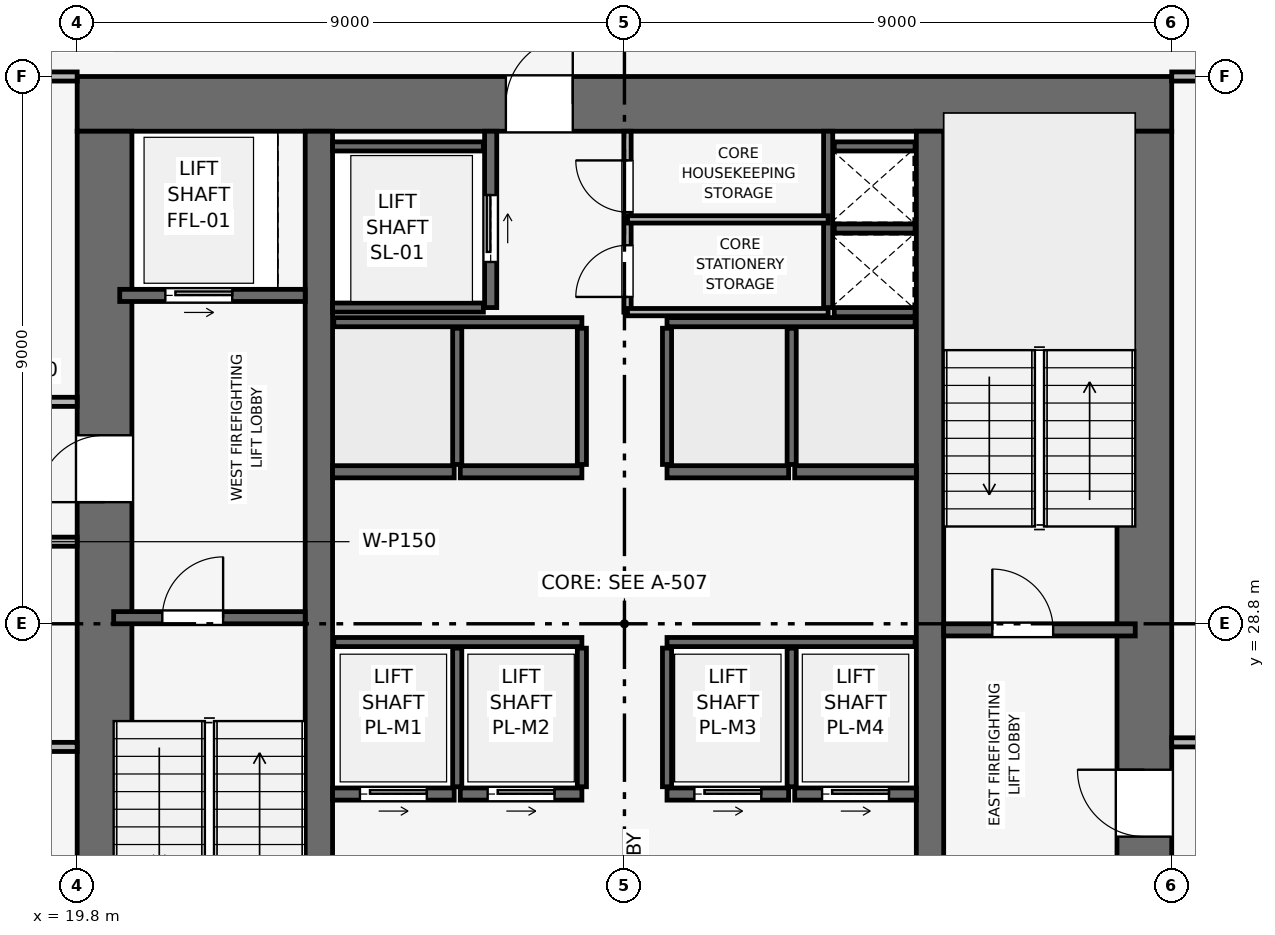
"""IFC4 building model, lengths in metres.
Left out: names, types, materials, properties, quantities, classifications, styles, units other than length and angle.
Written with IfcOpenShell. Run it as: python <this file> out.ifc"""

import sys

from ifc_helpers import new_model, si_unit, direction, frame, frame_2d, origin, place, context, subcontext, project, spatial, rectangle, extrude, element, fill, save


model = new_model("IFC4")
c1 = context("Model", 3, precision=1e-05, world=origin(), true_north=direction((0.0, 1.0)))
c2 = subcontext(c1, "Body", "Model", "MODEL_VIEW")
j1 = project(units=[si_unit("LENGTHUNIT", "METRE"), si_unit("PLANEANGLEUNIT", "RADIAN")], contexts=[c1])
p1 = place(None, origin())
s1 = spatial("IfcSite", under=j1, at=p1, CompositionType="ELEMENT")
p2 = place(p1, origin())
s2 = spatial("IfcBuilding", under=s1, at=p2, CompositionType="ELEMENT")
p3 = place(p2, frame((0.0, 0.0, 153.3)))
s3 = spatial("IfcBuildingStorey", under=s2, at=p3, CompositionType="ELEMENT", Elevation=153.3)
p4 = place(p3, frame((19.8, 37.35, 0.0), z_axis=(0.0, 0.0, 1.0), x_axis=(1.0, 0.0, 0.0)))
e1 = element("IfcWall", 1, at=p4, inside=s3, PredefinedType="SHEAR", context=c2, shape_type="SweptSolid", body=[
    extrude(rectangle(XDim=18.0, YDim=0.9, at=frame_2d((9.0, 0.0))), origin(), (0.0, 0.0, 1.0), 3.75),
])
p5 = place(p4, frame((7.05, 0.0, 0.0)))
e2 = element("IfcOpeningElement", 2, at=p5, cuts=e1, PredefinedType="OPENING", context=c2, shape_type="SweptSolid", body=[
    extrude(rectangle(XDim=1.1, YDim=2.15, at=frame_2d((0.55, 1.075))), frame((0.0, 0.46, 0.0), z_axis=(0.0, -1.0, 0.0), x_axis=(1.0, 0.0, 0.0)), (0.0, 0.0, 1.0), 0.92),
])
p6 = place(p3, frame((20.25, 20.7, 0.0), z_axis=(0.0, 0.0, 1.0), x_axis=(0.0, 1.0, 0.0)))
e3 = element("IfcWall", 3, at=p6, inside=s3, PredefinedType="SHEAR", context=c2, shape_type="SweptSolid", body=[
    extrude(rectangle(XDim=16.2, YDim=0.9, at=frame_2d((8.1, 0.0))), origin(), (0.0, 0.0, 1.0), 3.75),
])
p7 = place(p6, frame((10.1, 0.0, 0.0)))
e4 = element("IfcOpeningElement", 4, at=p7, cuts=e3, PredefinedType="OPENING", context=c2, shape_type="SweptSolid", body=[
    extrude(rectangle(XDim=1.1, YDim=2.15, at=frame_2d((0.55, 1.075))), frame((0.0, 0.46, 0.0), z_axis=(0.0, -1.0, 0.0), x_axis=(1.0, 0.0, 0.0)), (0.0, 0.0, 1.0), 0.92),
])
p8 = place(p3, frame((37.35, 20.7, 0.0), z_axis=(0.0, 0.0, 1.0), x_axis=(0.0, 1.0, 0.0)))
e5 = element("IfcWall", 5, at=p8, inside=s3, PredefinedType="SHEAR", context=c2, shape_type="SweptSolid", body=[
    extrude(rectangle(XDim=16.2, YDim=0.9, at=frame_2d((8.1, 0.0))), origin(), (0.0, 0.0, 1.0), 3.75),
])
p9 = place(p8, frame((4.6, 0.0, 0.0)))
e6 = element("IfcOpeningElement", 6, at=p9, cuts=e5, PredefinedType="OPENING", context=c2, shape_type="SweptSolid", body=[
    extrude(rectangle(XDim=1.1, YDim=2.15, at=frame_2d((0.55, 1.075))), frame((0.0, 0.46, 0.0), z_axis=(0.0, -1.0, 0.0), x_axis=(1.0, 0.0, 0.0)), (0.0, 0.0, 1.0), 0.92),
])
for number, where, z_axis, x_axis in (
    (7, (23.775, 20.7, 0.0), (0.0, 0.0, 1.0), (0.0, 1.0, 0.0)),
    (8, (33.825, 20.7, 0.0), (0.0, 0.0, 1.0), (0.0, 1.0, 0.0)),
):
    element("IfcWall", number, at=place(p3, frame(where, z_axis=z_axis, x_axis=x_axis)), inside=s3, PredefinedType="SHEAR", context=c2, shape_type="SweptSolid", body=[
        extrude(rectangle(XDim=16.2, YDim=0.45, at=frame_2d((8.1, 0.0))), origin(), (0.0, 0.0, 1.0), 3.75),
    ])
p10 = place(p3, frame((20.4, 28.9, 0.0), z_axis=(0.0, 0.0, 1.0), x_axis=(1.0, 0.0, 0.0)))
e9 = element("IfcWall", 9, at=p10, inside=s3, PredefinedType="SHEAR", context=c2, shape_type="SweptSolid", body=[
    extrude(rectangle(XDim=3.15, YDim=0.2, at=frame_2d((1.575, 0.0))), origin(), (0.0, 0.0, 1.0), 3.495),
])
p11 = place(p10, frame((0.8, 0.0, 0.0)))
e10 = element("IfcOpeningElement", 10, at=p11, cuts=e9, PredefinedType="OPENING", context=c2, shape_type="SweptSolid", body=[
    extrude(rectangle(XDim=1.0, YDim=2.1, at=frame_2d((0.5, 1.05))), frame((0.0, 0.11, 0.0), z_axis=(0.0, -1.0, 0.0), x_axis=(1.0, 0.0, 0.0)), (0.0, 0.0, 1.0), 0.22),
])
p12 = place(p3, frame((34.05, 28.7, 0.0), z_axis=(0.0, 0.0, 1.0), x_axis=(1.0, 0.0, 0.0)))
e11 = element("IfcWall", 11, at=p12, inside=s3, PredefinedType="SHEAR", context=c2, shape_type="SweptSolid", body=[
    extrude(rectangle(XDim=3.15, YDim=0.2, at=frame_2d((1.575, 0.0))), origin(), (0.0, 0.0, 1.0), 3.495),
])
p13 = place(p12, frame((0.8, 0.0, 0.0)))
e12 = element("IfcOpeningElement", 12, at=p13, cuts=e11, PredefinedType="OPENING", context=c2, shape_type="SweptSolid", body=[
    extrude(rectangle(XDim=1.0, YDim=2.1, at=frame_2d((0.5, 1.05))), frame((0.0, 0.11, 0.0), z_axis=(0.0, -1.0, 0.0), x_axis=(1.0, 0.0, 0.0)), (0.0, 0.0, 1.0), 0.22),
])
p14 = place(p3, frame((32.15, 34.0, 0.0), z_axis=(0.0, 0.0, 1.0), x_axis=(0.0, 1.0, 0.0)))
e13 = element("IfcWall", 13, at=p14, inside=s3, PredefinedType="SHEAR", context=c2, shape_type="SweptSolid", body=[
    extrude(rectangle(XDim=2.9, YDim=0.15, at=frame_2d((1.45, 0.0))), origin(), (0.0, 0.0, 1.0), 3.495),
])
for number, where, z_axis, x_axis in (
    (14, (32.25, 33.925, 0.0), (0.0, 0.0, 1.0), (1.0, 0.0, 0.0)),
    (15, (32.25, 35.3, 0.0), (0.0, 0.0, 1.0), (1.0, 0.0, 0.0)),
):
    element("IfcWall", number, at=place(p3, frame(where, z_axis=z_axis, x_axis=x_axis)), inside=s3, PredefinedType="SHEAR", context=c2, shape_type="SweptSolid", body=[
        extrude(rectangle(XDim=1.33, YDim=0.15, at=frame_2d((0.665, 0.0))), origin(), (0.0, 0.0, 1.0), 3.495),
    ])
p15 = place(p3, frame((20.5, 34.2, 0.0), z_axis=(0.0, 0.0, 1.0), x_axis=(1.0, 0.0, 0.0)))
e16 = element("IfcWall", 16, at=p15, inside=s3, PredefinedType="SHEAR", context=c2, shape_type="SweptSolid", body=[
    extrude(rectangle(XDim=3.05, YDim=0.2, at=frame_2d((1.525, 0.0))), origin(), (0.0, 0.0, 1.0), 3.495),
])
p16 = place(p15, frame((0.75, 0.0, 0.0)))
e17 = element("IfcOpeningElement", 17, at=p16, cuts=e16, PredefinedType="OPENING", context=c2, shape_type="SweptSolid", body=[
    extrude(rectangle(XDim=1.1, YDim=2.15, at=frame_2d((0.55, 1.075))), frame((0.0, 0.11, 0.0), z_axis=(0.0, -1.0, 0.0), x_axis=(1.0, 0.0, 0.0)), (0.0, 0.0, 1.0), 0.22),
])
p17 = place(p3, frame((26.6, 34.0, 0.0), z_axis=(0.0, 0.0, 1.0), x_axis=(0.0, 1.0, 0.0)))
e18 = element("IfcWall", 18, at=p17, inside=s3, PredefinedType="SHEAR", context=c2, shape_type="SweptSolid", body=[
    extrude(rectangle(XDim=2.9, YDim=0.2, at=frame_2d((1.45, 0.0))), origin(), (0.0, 0.0, 1.0), 3.495),
])
p18 = place(p17, frame((0.75, 0.0, 0.0)))
e19 = element("IfcOpeningElement", 19, at=p18, cuts=e18, PredefinedType="OPENING", context=c2, shape_type="SweptSolid", body=[
    extrude(rectangle(XDim=1.1, YDim=2.15, at=frame_2d((0.55, 1.075))), frame((0.0, 0.11, 0.0), z_axis=(0.0, -1.0, 0.0), x_axis=(1.0, 0.0, 0.0)), (0.0, 0.0, 1.0), 0.22),
])
for number, where, z_axis, x_axis in (
    (20, (24.0, 34.0, 0.0), (0.0, 0.0, 1.0), (1.0, 0.0, 0.0)),
    (21, (24.0, 36.65, 0.0), (0.0, 0.0, 1.0), (1.0, 0.0, 0.0)),
):
    element("IfcWall", number, at=place(p3, frame(where, z_axis=z_axis, x_axis=x_axis)), inside=s3, PredefinedType="SHEAR", context=c2, shape_type="SweptSolid", body=[
        extrude(rectangle(XDim=2.48, YDim=0.15, at=frame_2d((1.24, 0.0))), origin(), (0.0, 0.0, 1.0), 3.495),
    ])
p19 = place(p3, frame((24.0, 26.0, 0.0), z_axis=(0.0, 0.0, 1.0), x_axis=(1.0, 0.0, 0.0)))
e22 = element("IfcWall", 22, at=p19, inside=s3, PredefinedType="SHEAR", context=c2, shape_type="SweptSolid", body=[
    extrude(rectangle(XDim=2.0, YDim=0.2, at=frame_2d((1.0, 0.0))), origin(), (0.0, 0.0, 1.0), 3.495),
])
p20 = place(p19, frame((0.45, 0.0, 0.0)))
e23 = element("IfcOpeningElement", 23, at=p20, cuts=e22, PredefinedType="OPENING", context=c2, shape_type="SweptSolid", body=[
    extrude(rectangle(XDim=1.1, YDim=2.15, at=frame_2d((0.55, 1.075))), frame((0.0, 0.11, 0.0), z_axis=(0.0, -1.0, 0.0), x_axis=(1.0, 0.0, 0.0)), (0.0, 0.0, 1.0), 0.22),
])
p21 = place(p3, frame((26.1, 26.0, 0.0), z_axis=(0.0, 0.0, 1.0), x_axis=(1.0, 0.0, 0.0)))
e24 = element("IfcWall", 24, at=p21, inside=s3, PredefinedType="SHEAR", context=c2, shape_type="SweptSolid", body=[
    extrude(rectangle(XDim=2.0, YDim=0.2, at=frame_2d((1.0, 0.0))), origin(), (0.0, 0.0, 1.0), 3.495),
])
p22 = place(p21, frame((0.45, 0.0, 0.0)))
e25 = element("IfcOpeningElement", 25, at=p22, cuts=e24, PredefinedType="OPENING", context=c2, shape_type="SweptSolid", body=[
    extrude(rectangle(XDim=1.1, YDim=2.15, at=frame_2d((0.55, 1.075))), frame((0.0, 0.11, 0.0), z_axis=(0.0, -1.0, 0.0), x_axis=(1.0, 0.0, 0.0)), (0.0, 0.0, 1.0), 0.22),
])
p23 = place(p3, frame((29.5, 26.0, 0.0), z_axis=(0.0, 0.0, 1.0), x_axis=(1.0, 0.0, 0.0)))
e26 = element("IfcWall", 26, at=p23, inside=s3, PredefinedType="SHEAR", context=c2, shape_type="SweptSolid", body=[
    extrude(rectangle(XDim=2.0, YDim=0.2, at=frame_2d((1.0, 0.0))), origin(), (0.0, 0.0, 1.0), 3.495),
])
p24 = place(p23, frame((0.45, 0.0, 0.0)))
e27 = element("IfcOpeningElement", 27, at=p24, cuts=e26, PredefinedType="OPENING", context=c2, shape_type="SweptSolid", body=[
    extrude(rectangle(XDim=1.1, YDim=2.15, at=frame_2d((0.55, 1.075))), frame((0.0, 0.11, 0.0), z_axis=(0.0, -1.0, 0.0), x_axis=(1.0, 0.0, 0.0)), (0.0, 0.0, 1.0), 0.22),
])
p25 = place(p3, frame((31.6, 26.0, 0.0), z_axis=(0.0, 0.0, 1.0), x_axis=(1.0, 0.0, 0.0)))
e28 = element("IfcWall", 28, at=p25, inside=s3, PredefinedType="SHEAR", context=c2, shape_type="SweptSolid", body=[
    extrude(rectangle(XDim=2.0, YDim=0.2, at=frame_2d((1.0, 0.0))), origin(), (0.0, 0.0, 1.0), 3.495),
])
p26 = place(p25, frame((0.45, 0.0, 0.0)))
e29 = element("IfcOpeningElement", 29, at=p26, cuts=e28, PredefinedType="OPENING", context=c2, shape_type="SweptSolid", body=[
    extrude(rectangle(XDim=1.1, YDim=2.15, at=frame_2d((0.55, 1.075))), frame((0.0, 0.11, 0.0), z_axis=(0.0, -1.0, 0.0), x_axis=(1.0, 0.0, 0.0)), (0.0, 0.0, 1.0), 0.22),
])
for number, where, z_axis, x_axis in (
    (30, (24.0, 31.3, 0.0), (0.0, 0.0, 1.0), (1.0, 0.0, 0.0)),
    (31, (26.1, 31.3, 0.0), (0.0, 0.0, 1.0), (1.0, 0.0, 0.0)),
    (32, (29.5, 31.3, 0.0), (0.0, 0.0, 1.0), (1.0, 0.0, 0.0)),
    (33, (31.6, 31.3, 0.0), (0.0, 0.0, 1.0), (1.0, 0.0, 0.0)),
):
    element("IfcWall", number, at=place(p3, frame(where, z_axis=z_axis, x_axis=x_axis)), inside=s3, PredefinedType="SHEAR", context=c2, shape_type="SweptSolid", body=[
        extrude(rectangle(XDim=2.0, YDim=0.2, at=frame_2d((1.0, 0.0))), origin(), (0.0, 0.0, 1.0), 3.495),
    ])
p27 = place(p3, frame((32.25, 36.65, 0.0), z_axis=(0.0, 0.0, 1.0), x_axis=(1.0, 0.0, 0.0)))
e34 = element("IfcWall", 34, at=p27, inside=s3, PredefinedType="SHEAR", context=c2, shape_type="SweptSolid", body=[
    extrude(rectangle(XDim=1.33, YDim=0.15, at=frame_2d((0.665, 0.0))), origin(), (0.0, 0.0, 1.0), 3.495),
])
for number, where, z_axis, x_axis in (
    (35, (24.02, 28.5, 0.0), (0.0, 0.0, 1.0), (1.0, 0.0, 0.0)),
    (36, (29.5, 28.5, 0.0), (0.0, 0.0, 1.0), (1.0, 0.0, 0.0)),
):
    element("IfcWall", number, at=place(p3, frame(where, z_axis=z_axis, x_axis=x_axis)), inside=s3, PredefinedType="SHEAR", context=c2, shape_type="SweptSolid", body=[
        extrude(rectangle(XDim=4.08, YDim=0.15, at=frame_2d((2.04, 0.0))), origin(), (0.0, 0.0, 1.0), 3.495),
    ])
for number, where, z_axis, x_axis in (
    (37, (26.05, 26.12, 0.0), (0.0, 0.0, 1.0), (0.0, 1.0, 0.0)),
    (38, (28.1, 26.12, 0.0), (0.0, 0.0, 1.0), (0.0, 1.0, 0.0)),
    (39, (29.5, 26.12, 0.0), (0.0, 0.0, 1.0), (0.0, 1.0, 0.0)),
    (40, (31.55, 26.12, 0.0), (0.0, 0.0, 1.0), (0.0, 1.0, 0.0)),
):
    element("IfcWall", number, at=place(p3, frame(where, z_axis=z_axis, x_axis=x_axis)), inside=s3, PredefinedType="SHEAR", context=c2, shape_type="SweptSolid", body=[
        extrude(rectangle(XDim=2.28, YDim=0.15, at=frame_2d((1.14, 0.0))), origin(), (0.0, 0.0, 1.0), 3.495),
    ])
for number, where, z_axis, x_axis in (
    (41, (24.02, 33.76, 0.0), (0.0, 0.0, 1.0), (1.0, 0.0, 0.0)),
    (42, (29.5, 33.76, 0.0), (0.0, 0.0, 1.0), (1.0, 0.0, 0.0)),
):
    element("IfcWall", number, at=place(p3, frame(where, z_axis=z_axis, x_axis=x_axis)), inside=s3, PredefinedType="SHEAR", context=c2, shape_type="SweptSolid", body=[
        extrude(rectangle(XDim=4.08, YDim=0.15, at=frame_2d((2.04, 0.0))), origin(), (0.0, 0.0, 1.0), 3.495),
    ])
for number, where, z_axis, x_axis in (
    (43, (26.05, 31.42, 0.0), (0.0, 0.0, 1.0), (0.0, 1.0, 0.0)),
    (44, (28.1, 31.42, 0.0), (0.0, 0.0, 1.0), (0.0, 1.0, 0.0)),
    (45, (29.5, 31.42, 0.0), (0.0, 0.0, 1.0), (0.0, 1.0, 0.0)),
    (46, (31.55, 31.42, 0.0), (0.0, 0.0, 1.0), (0.0, 1.0, 0.0)),
):
    element("IfcWall", number, at=place(p3, frame(where, z_axis=z_axis, x_axis=x_axis)), inside=s3, PredefinedType="SHEAR", context=c2, shape_type="SweptSolid", body=[
        extrude(rectangle(XDim=2.24, YDim=0.15, at=frame_2d((1.12, 0.0))), origin(), (0.0, 0.0, 1.0), 3.495),
    ])
p28 = place(p3, frame((28.85, 33.925, 0.0), z_axis=(0.0, 0.0, 1.0), x_axis=(0.0, 1.0, 0.0)))
e47 = element("IfcWall", 47, at=p28, inside=s3, PredefinedType="PARTITIONING", context=c2, shape_type="SweptSolid", body=[
    extrude(rectangle(XDim=2.975, YDim=0.12, at=frame_2d((1.487, 0.0))), origin(), (0.0, 0.0, 1.0), 3.495),
])
p29 = place(p28, frame((0.25, 0.0, 0.0)))
e48 = element("IfcOpeningElement", 48, at=p29, cuts=e47, PredefinedType="OPENING", context=c2, shape_type="SweptSolid", body=[
    extrude(rectangle(XDim=0.85, YDim=2.1, at=frame_2d((0.425, 1.05))), frame((0.0, 0.07, 0.0), z_axis=(0.0, -1.0, 0.0), x_axis=(1.0, 0.0, 0.0)), (0.0, 0.0, 1.0), 0.14),
])
p30 = place(p28, frame((1.645, 0.0, 0.0)))
e49 = element("IfcOpeningElement", 49, at=p30, cuts=e47, PredefinedType="OPENING", context=c2, shape_type="SweptSolid", body=[
    extrude(rectangle(XDim=0.85, YDim=2.1, at=frame_2d((0.425, 1.05))), frame((0.0, 0.07, 0.0), z_axis=(0.0, -1.0, 0.0), x_axis=(1.0, 0.0, 0.0)), (0.0, 0.0, 1.0), 0.14),
])
for number, where, z_axis, x_axis in (
    (50, (28.85, 35.45, 0.0), (0.0, 0.0, 1.0), (1.0, 0.0, 0.0)),
    (51, (28.85, 33.925, 0.0), (0.0, 0.0, 1.0), (1.0, 0.0, 0.0)),
):
    element("IfcWall", number, at=place(p3, frame(where, z_axis=z_axis, x_axis=x_axis)), inside=s3, PredefinedType="PARTITIONING", context=c2, shape_type="SweptSolid", body=[
        extrude(rectangle(XDim=3.3, YDim=0.12, at=frame_2d((1.65, 0.0))), origin(), (0.0, 0.0, 1.0), 3.495),
    ])
for number, where, z_axis, x_axis in (
    (52, (15.4, 26.775, 0.0), (0.0, 0.0, 1.0), (1.0, 0.0, 0.0)),
    (53, (15.4, 30.15, 0.0), (0.0, 0.0, 1.0), (1.0, 0.0, 0.0)),
    (54, (15.4, 32.45, 0.0), (0.0, 0.0, 1.0), (1.0, 0.0, 0.0)),
):
    element("IfcWall", number, at=place(p3, frame(where, z_axis=z_axis, x_axis=x_axis)), inside=s3, PredefinedType="PARTITIONING", context=c2, shape_type="SweptSolid", body=[
        extrude(rectangle(XDim=4.4, YDim=0.15, at=frame_2d((2.2, 0.0))), origin(), (0.0, 0.0, 1.0), 3.495),
    ])
p31 = place(p3, frame((15.4, 37.8, 0.0), z_axis=(0.0, 0.0, 1.0), x_axis=(1.0, 0.0, 0.0)))
e55 = element("IfcWall", 55, at=p31, inside=s3, PredefinedType="PARTITIONING", context=c2, shape_type="SweptSolid", body=[
    extrude(rectangle(XDim=4.4, YDim=0.15, at=frame_2d((2.2, 0.0))), origin(), (0.0, 0.0, 1.0), 3.03),
])
p32 = place(p3, frame((37.8, 26.85, 0.0), z_axis=(0.0, 0.0, 1.0), x_axis=(1.0, 0.0, 0.0)))
e56 = element("IfcWall", 56, at=p32, inside=s3, PredefinedType="PARTITIONING", context=c2, shape_type="SweptSolid", body=[
    extrude(rectangle(XDim=2.25, YDim=0.15, at=frame_2d((1.125, 0.0))), origin(), (0.0, 0.0, 1.0), 3.495),
])
p33 = place(p3, frame((37.8, 37.8, 0.0), z_axis=(0.0, 0.0, 1.0), x_axis=(1.0, 0.0, 0.0)))
e57 = element("IfcWall", 57, at=p33, inside=s3, PredefinedType="PARTITIONING", context=c2, shape_type="SweptSolid", body=[
    extrude(rectangle(XDim=15.17, YDim=0.15, at=frame_2d((7.585, 0.0))), origin(), (0.0, 0.0, 1.0), 2.98),
])
p34 = place(p33, frame((2.05, 0.0, 0.0)))
e58 = element("IfcOpeningElement", 58, at=p34, cuts=e57, PredefinedType="OPENING", context=c2, shape_type="SweptSolid", body=[
    extrude(rectangle(XDim=0.9, YDim=2.1, at=frame_2d((0.45, 1.05))), frame((0.0, 0.085, 0.0), z_axis=(0.0, -1.0, 0.0), x_axis=(1.0, 0.0, 0.0)), (0.0, 0.0, 1.0), 0.17),
])
p35 = place(p11, origin())
e59 = element("IfcDoor", 59, at=p35, inside=s3, OperationType="SINGLE_SWING_RIGHT", PredefinedType="DOOR", context=c2, shape_type="SweptSolid", body=[
    extrude(rectangle(XDim=1.0, YDim=2.1, at=frame_2d((0.5, 1.05))), frame((0.0, 0.025, 0.0), z_axis=(0.0, -1.0, 0.0), x_axis=(1.0, 0.0, 0.0)), (0.0, 0.0, 1.0), 0.05),
])
fill(e10, e59)
p36 = place(p13, origin())
e60 = element("IfcDoor", 60, at=p36, inside=s3, OperationType="SINGLE_SWING_LEFT", PredefinedType="DOOR", context=c2, shape_type="SweptSolid", body=[
    extrude(rectangle(XDim=1.0, YDim=2.1, at=frame_2d((0.5, 1.05))), frame((0.0, 0.025, 0.0), z_axis=(0.0, -1.0, 0.0), x_axis=(1.0, 0.0, 0.0)), (0.0, 0.0, 1.0), 0.05),
])
fill(e12, e60)
p37 = place(p16, origin())
e61 = element("IfcDoor", 61, at=p37, inside=s3, OperationType="SLIDING_TO_RIGHT", PredefinedType="DOOR", context=c2, shape_type="SweptSolid", body=[
    extrude(rectangle(XDim=1.1, YDim=2.15, at=frame_2d((0.55, 1.075))), frame((0.0, 0.025, 0.0), z_axis=(0.0, -1.0, 0.0), x_axis=(1.0, 0.0, 0.0)), (0.0, 0.0, 1.0), 0.05),
])
fill(e17, e61)
p38 = place(p18, origin())
e62 = element("IfcDoor", 62, at=p38, inside=s3, OperationType="SLIDING_TO_RIGHT", PredefinedType="DOOR", context=c2, shape_type="SweptSolid", body=[
    extrude(rectangle(XDim=1.1, YDim=2.15, at=frame_2d((0.55, 1.075))), frame((0.0, 0.025, 0.0), z_axis=(0.0, -1.0, 0.0), x_axis=(1.0, 0.0, 0.0)), (0.0, 0.0, 1.0), 0.05),
])
fill(e19, e62)
p39 = place(p20, origin())
e63 = element("IfcDoor", 63, at=p39, inside=s3, OperationType="SLIDING_TO_RIGHT", PredefinedType="DOOR", context=c2, shape_type="SweptSolid", body=[
    extrude(rectangle(XDim=1.1, YDim=2.15, at=frame_2d((0.55, 1.075))), frame((0.0, 0.025, 0.0), z_axis=(0.0, -1.0, 0.0), x_axis=(1.0, 0.0, 0.0)), (0.0, 0.0, 1.0), 0.05),
])
fill(e23, e63)
p40 = place(p22, origin())
e64 = element("IfcDoor", 64, at=p40, inside=s3, OperationType="SLIDING_TO_RIGHT", PredefinedType="DOOR", context=c2, shape_type="SweptSolid", body=[
    extrude(rectangle(XDim=1.1, YDim=2.15, at=frame_2d((0.55, 1.075))), frame((0.0, 0.025, 0.0), z_axis=(0.0, -1.0, 0.0), x_axis=(1.0, 0.0, 0.0)), (0.0, 0.0, 1.0), 0.05),
])
fill(e25, e64)
p41 = place(p24, origin())
e65 = element("IfcDoor", 65, at=p41, inside=s3, OperationType="SLIDING_TO_RIGHT", PredefinedType="DOOR", context=c2, shape_type="SweptSolid", body=[
    extrude(rectangle(XDim=1.1, YDim=2.15, at=frame_2d((0.55, 1.075))), frame((0.0, 0.025, 0.0), z_axis=(0.0, -1.0, 0.0), x_axis=(1.0, 0.0, 0.0)), (0.0, 0.0, 1.0), 0.05),
])
fill(e27, e65)
p42 = place(p26, origin())
e66 = element("IfcDoor", 66, at=p42, inside=s3, OperationType="SLIDING_TO_RIGHT", PredefinedType="DOOR", context=c2, shape_type="SweptSolid", body=[
    extrude(rectangle(XDim=1.1, YDim=2.15, at=frame_2d((0.55, 1.075))), frame((0.0, 0.025, 0.0), z_axis=(0.0, -1.0, 0.0), x_axis=(1.0, 0.0, 0.0)), (0.0, 0.0, 1.0), 0.05),
])
fill(e29, e66)
p43 = place(p29, origin())
e67 = element("IfcDoor", 67, at=p43, inside=s3, OperationType="SINGLE_SWING_LEFT", PredefinedType="DOOR", context=c2, shape_type="SweptSolid", body=[
    extrude(rectangle(XDim=0.85, YDim=2.1, at=frame_2d((0.425, 1.05))), frame((0.0, 0.025, 0.0), z_axis=(0.0, -1.0, 0.0), x_axis=(1.0, 0.0, 0.0)), (0.0, 0.0, 1.0), 0.05),
])
fill(e48, e67)
p44 = place(p30, origin())
e68 = element("IfcDoor", 68, at=p44, inside=s3, OperationType="SINGLE_SWING_RIGHT", PredefinedType="DOOR", context=c2, shape_type="SweptSolid", body=[
    extrude(rectangle(XDim=0.85, YDim=2.1, at=frame_2d((0.425, 1.05))), frame((0.0, 0.025, 0.0), z_axis=(0.0, -1.0, 0.0), x_axis=(1.0, 0.0, 0.0)), (0.0, 0.0, 1.0), 0.05),
])
fill(e49, e68)
p45 = place(p7, origin())
e69 = element("IfcDoor", 69, at=p45, inside=s3, OperationType="SINGLE_SWING_LEFT", PredefinedType="DOOR", context=c2, shape_type="SweptSolid", body=[
    extrude(rectangle(XDim=1.1, YDim=2.15, at=frame_2d((0.55, 1.075))), frame((0.0, 0.025, 0.0), z_axis=(0.0, -1.0, 0.0), x_axis=(1.0, 0.0, 0.0)), (0.0, 0.0, 1.0), 0.05),
])
fill(e4, e69)
p46 = place(p9, origin())
e70 = element("IfcDoor", 70, at=p46, inside=s3, OperationType="SINGLE_SWING_RIGHT", PredefinedType="DOOR", context=c2, shape_type="SweptSolid", body=[
    extrude(rectangle(XDim=1.1, YDim=2.15, at=frame_2d((0.55, 1.075))), frame((0.0, 0.025, 0.0), z_axis=(0.0, -1.0, 0.0), x_axis=(1.0, 0.0, 0.0)), (0.0, 0.0, 1.0), 0.05),
])
fill(e6, e70)
p47 = place(p5, origin())
e71 = element("IfcDoor", 71, at=p47, inside=s3, OperationType="SINGLE_SWING_RIGHT", PredefinedType="DOOR", context=c2, shape_type="SweptSolid", body=[
    extrude(rectangle(XDim=1.1, YDim=2.15, at=frame_2d((0.55, 1.075))), frame((0.0, 0.025, 0.0), z_axis=(0.0, -1.0, 0.0), x_axis=(1.0, 0.0, 0.0)), (0.0, 0.0, 1.0), 0.05),
])
fill(e2, e71)
save(model, sys.argv[1])
